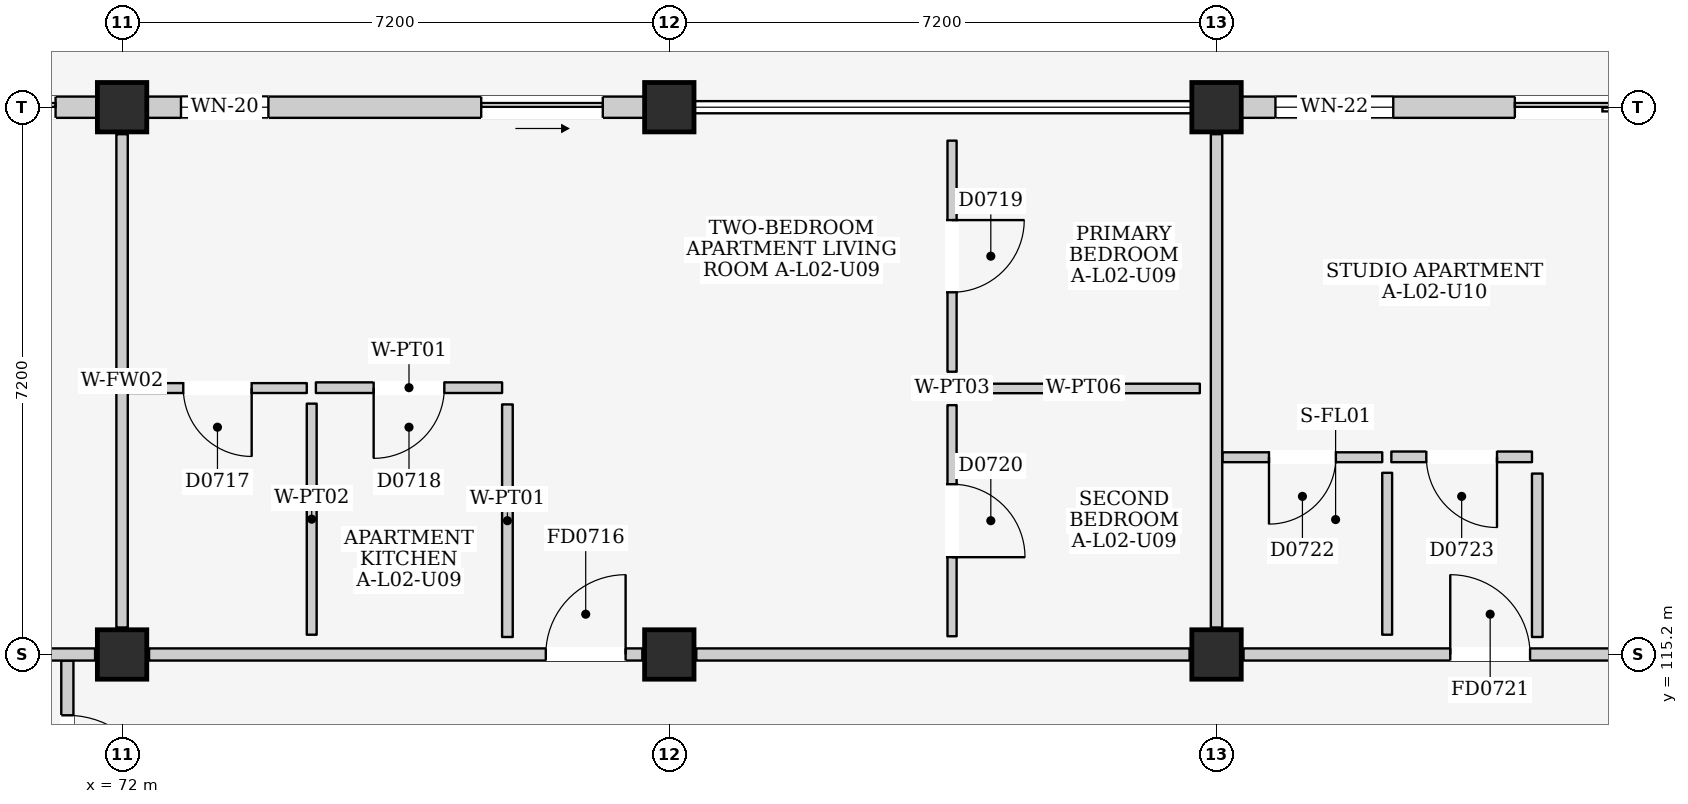
"""IFC4 building model, lengths in metres.
Left out: names, types, materials, properties, quantities, classifications, styles, units other than length and angle.
Written with IfcOpenShell. Run it as: python <this file> out.ifc"""

import sys

from ifc_helpers import new_model, si_unit, direction, frame, frame_2d, origin, origin_2d, place, context, subcontext, project, spatial, rectangle, extrude, element, fill, save


model = new_model("IFC4")
c1 = context("Model", 3, precision=1e-05, world=origin(), true_north=direction((0.0, 1.0)))
c2 = subcontext(c1, "Body", "Model", "MODEL_VIEW")
j1 = project(units=[si_unit("LENGTHUNIT", "METRE"), si_unit("PLANEANGLEUNIT", "RADIAN")], contexts=[c1])
p1 = place(None, origin())
s1 = spatial("IfcSite", under=j1, at=p1, CompositionType="ELEMENT")
p2 = place(p1, origin())
s2 = spatial("IfcBuilding", under=s1, at=p2, CompositionType="ELEMENT")
p3 = place(p2, frame((0.0, 0.0, 9.0)))
s3 = spatial("IfcBuildingStorey", under=s2, at=p3, CompositionType="ELEMENT", Elevation=9.0)
for number, where, z_axis, x_axis in (
    (1, (72.0, 115.2, 0.0), (0.0, 0.0, 1.0), (1.0, 0.0, 0.0)),
    (2, (72.0, 122.4, 0.0), (0.0, 0.0, 1.0), (1.0, 0.0, 0.0)),
    (3, (79.2, 115.2, 0.0), (0.0, 0.0, 1.0), (1.0, 0.0, 0.0)),
    (4, (79.2, 122.4, 0.0), (0.0, 0.0, 1.0), (1.0, 0.0, 0.0)),
    (5, (86.4, 115.2, 0.0), (0.0, 0.0, 1.0), (1.0, 0.0, 0.0)),
    (6, (86.4, 122.4, 0.0), (0.0, 0.0, 1.0), (1.0, 0.0, 0.0)),
):
    element("IfcColumn", number, at=place(p3, frame(where, z_axis=z_axis, x_axis=x_axis)), inside=s3, PredefinedType="COLUMN", context=c2, shape_type="SweptSolid", body=[
        extrude(rectangle(XDim=0.65, YDim=0.65, at=origin_2d()), origin(), (0.0, 0.0, 1.0), 3.2),
    ])
p4 = place(p3, frame((65.125, 122.4, 0.0), z_axis=(0.0, 0.0, 1.0), x_axis=(1.0, 0.0, 0.0)))
e7 = element("IfcWall", 7, at=p4, inside=s3, PredefinedType="ELEMENTEDWALL", context=c2, shape_type="SweptSolid", body=[
    extrude(rectangle(XDim=6.55, YDim=0.28, at=frame_2d((3.275, 0.0))), origin(), (0.0, 0.0, 1.0), 2.425),
])
p5 = place(p4, frame((4.2, 0.0, 0.0)))
e8 = element("IfcOpeningElement", 8, at=p5, cuts=e7, PredefinedType="OPENING", context=c2, shape_type="SweptSolid", body=[
    extrude(rectangle(XDim=1.8, YDim=2.12, at=frame_2d((0.9, 1.06))), frame((0.0, 0.155, 0.0), z_axis=(0.0, -1.0, 0.0), x_axis=(1.0, 0.0, 0.0)), (0.0, 0.0, 1.0), 0.31),
])
p6 = place(p4, frame((0.45, 0.0, 0.9)))
e9 = element("IfcOpeningElement", 9, at=p6, cuts=e7, PredefinedType="OPENING", context=c2, shape_type="SweptSolid", body=[
    extrude(rectangle(XDim=1.65, YDim=1.35, at=frame_2d((0.825, 0.675))), frame((0.0, 0.155, 0.0), z_axis=(0.0, -1.0, 0.0), x_axis=(1.0, 0.0, 0.0)), (0.0, 0.0, 1.0), 0.31),
])
p7 = place(p3, frame((72.325, 122.4, 0.0), z_axis=(0.0, 0.0, 1.0), x_axis=(1.0, 0.0, 0.0)))
e10 = element("IfcWall", 10, at=p7, inside=s3, PredefinedType="ELEMENTEDWALL", context=c2, shape_type="SweptSolid", body=[
    extrude(rectangle(XDim=6.55, YDim=0.28, at=frame_2d((3.275, 0.0))), origin(), (0.0, 0.0, 1.0), 2.425),
])
p8 = place(p7, frame((4.4, 0.0, 0.0)))
e11 = element("IfcOpeningElement", 11, at=p8, cuts=e10, PredefinedType="OPENING", context=c2, shape_type="SweptSolid", body=[
    extrude(rectangle(XDim=1.6, YDim=2.12, at=frame_2d((0.8, 1.06))), frame((0.0, 0.155, 0.0), z_axis=(0.0, -1.0, 0.0), x_axis=(1.0, 0.0, 0.0)), (0.0, 0.0, 1.0), 0.31),
])
p9 = place(p7, frame((0.45, 0.0, 0.9)))
e12 = element("IfcOpeningElement", 12, at=p9, cuts=e10, PredefinedType="OPENING", context=c2, shape_type="SweptSolid", body=[
    extrude(rectangle(XDim=1.15, YDim=1.15, at=frame_2d((0.575, 0.575))), frame((0.0, 0.155, 0.0), z_axis=(0.0, -1.0, 0.0), x_axis=(1.0, 0.0, 0.0)), (0.0, 0.0, 1.0), 0.31),
])
p10 = place(p3, frame((86.725, 122.4, 0.0), z_axis=(0.0, 0.0, 1.0), x_axis=(1.0, 0.0, 0.0)))
e13 = element("IfcWall", 13, at=p10, inside=s3, PredefinedType="ELEMENTEDWALL", context=c2, shape_type="SweptSolid", body=[
    extrude(rectangle(XDim=6.55, YDim=0.28, at=frame_2d((3.275, 0.0))), origin(), (0.0, 0.0, 1.0), 2.425),
])
p11 = place(p10, frame((3.6, 0.0, 0.0)))
e14 = element("IfcOpeningElement", 14, at=p11, cuts=e13, PredefinedType="OPENING", context=c2, shape_type="SweptSolid", body=[
    extrude(rectangle(XDim=2.4, YDim=2.12, at=frame_2d((1.2, 1.06))), frame((0.0, 0.155, 0.0), z_axis=(0.0, -1.0, 0.0), x_axis=(1.0, 0.0, 0.0)), (0.0, 0.0, 1.0), 0.31),
])
p12 = place(p10, frame((0.45, 0.0, 0.865)))
e15 = element("IfcOpeningElement", 15, at=p12, cuts=e13, PredefinedType="OPENING", context=c2, shape_type="SweptSolid", body=[
    extrude(rectangle(XDim=1.55, YDim=1.45, at=frame_2d((0.775, 0.725))), frame((0.0, 0.155, 0.0), z_axis=(0.0, -1.0, 0.0), x_axis=(1.0, 0.0, 0.0)), (0.0, 0.0, 1.0), 0.31),
])
p13 = place(p3, frame((71.28, 110.8, 0.0), z_axis=(0.0, 0.0, 1.0), x_axis=(0.0, 1.0, 0.0)))
e16 = element("IfcWall", 16, at=p13, inside=s3, PredefinedType="PARTITIONING", context=c2, shape_type="SweptSolid", body=[
    extrude(rectangle(XDim=4.32, YDim=0.16, at=frame_2d((2.16, 0.0))), origin(), (0.0, 0.0, 1.0), 2.96),
])
p14 = place(p13, frame((2.4, 0.0, 0.0)))
e17 = element("IfcOpeningElement", 17, at=p14, cuts=e16, PredefinedType="OPENING", context=c2, shape_type="SweptSolid", body=[
    extrude(rectangle(XDim=1.2, YDim=2.2, at=frame_2d((0.6, 1.1))), frame((0.0, 0.095, 0.0), z_axis=(0.0, -1.0, 0.0), x_axis=(1.0, 0.0, 0.0)), (0.0, 0.0, 1.0), 0.19),
])
p15 = place(p3, frame((65.155, 115.2, 0.0), z_axis=(0.0, 0.0, 1.0), x_axis=(1.0, 0.0, 0.0)))
e18 = element("IfcWall", 18, at=p15, inside=s3, PredefinedType="PARTITIONING", context=c2, shape_type="SweptSolid", body=[
    extrude(rectangle(XDim=6.49, YDim=0.16, at=frame_2d((3.245, 0.0))), origin(), (0.0, 0.0, 1.0), 2.295),
])
p16 = place(p15, frame((2.72, 0.0, 0.0)))
e19 = element("IfcOpeningElement", 19, at=p16, cuts=e18, PredefinedType="OPENING", context=c2, shape_type="SweptSolid", body=[
    extrude(rectangle(XDim=1.05, YDim=2.15, at=frame_2d((0.525, 1.075))), frame((0.0, 0.095, 0.0), z_axis=(0.0, -1.0, 0.0), x_axis=(1.0, 0.0, 0.0)), (0.0, 0.0, 1.0), 0.19),
])
p17 = place(p3, frame((72.0, 115.555, 0.0), z_axis=(0.0, 0.0, 1.0), x_axis=(0.0, 1.0, 0.0)))
e20 = element("IfcWall", 20, at=p17, inside=s3, PredefinedType="PARTITIONING", context=c2, shape_type="SweptSolid", body=[
    extrude(rectangle(XDim=6.49, YDim=0.15, at=frame_2d((3.245, 0.0))), origin(), (0.0, 0.0, 1.0), 2.395),
])
p18 = place(p3, frame((72.355, 115.2, 0.0), z_axis=(0.0, 0.0, 1.0), x_axis=(1.0, 0.0, 0.0)))
e21 = element("IfcWall", 21, at=p18, inside=s3, PredefinedType="PARTITIONING", context=c2, shape_type="SweptSolid", body=[
    extrude(rectangle(XDim=6.49, YDim=0.16, at=frame_2d((3.245, 0.0))), origin(), (0.0, 0.0, 1.0), 2.295),
])
p19 = place(p18, frame((5.22, 0.0, 0.0)))
e22 = element("IfcOpeningElement", 22, at=p19, cuts=e21, PredefinedType="OPENING", context=c2, shape_type="SweptSolid", body=[
    extrude(rectangle(XDim=1.05, YDim=2.15, at=frame_2d((0.525, 1.075))), frame((0.0, 0.095, 0.0), z_axis=(0.0, -1.0, 0.0), x_axis=(1.0, 0.0, 0.0)), (0.0, 0.0, 1.0), 0.19),
])
p20 = place(p3, frame((79.555, 115.2, 0.0), z_axis=(0.0, 0.0, 1.0), x_axis=(1.0, 0.0, 0.0)))
e23 = element("IfcWall", 23, at=p20, inside=s3, PredefinedType="PARTITIONING", context=c2, shape_type="SweptSolid", body=[
    extrude(rectangle(XDim=6.49, YDim=0.16, at=frame_2d((3.245, 0.0))), origin(), (0.0, 0.0, 1.0), 2.295),
])
p21 = place(p3, frame((86.4, 115.555, 0.0), z_axis=(0.0, 0.0, 1.0), x_axis=(0.0, 1.0, 0.0)))
e24 = element("IfcWall", 24, at=p21, inside=s3, PredefinedType="PARTITIONING", context=c2, shape_type="SweptSolid", body=[
    extrude(rectangle(XDim=6.49, YDim=0.15, at=frame_2d((3.245, 0.0))), origin(), (0.0, 0.0, 1.0), 2.395),
])
p22 = place(p3, frame((72.08, 118.705, 0.0), z_axis=(0.0, 0.0, 1.0), x_axis=(1.0, 0.0, 0.0)))
e25 = element("IfcWall", 25, at=p22, inside=s3, PredefinedType="PARTITIONING", context=c2, shape_type="SweptSolid", body=[
    extrude(rectangle(XDim=2.35, YDim=0.13, at=frame_2d((1.175, 0.0))), origin(), (0.0, 0.0, 1.0), 2.96),
])
p23 = place(p22, frame((0.725, 0.0, 0.0)))
e26 = element("IfcOpeningElement", 26, at=p23, cuts=e25, PredefinedType="OPENING", context=c2, shape_type="SweptSolid", body=[
    extrude(rectangle(XDim=0.9, YDim=2.1, at=frame_2d((0.45, 1.05))), frame((0.0, 0.08, 0.0), z_axis=(0.0, -1.0, 0.0), x_axis=(1.0, 0.0, 0.0)), (0.0, 0.0, 1.0), 0.16),
])
p24 = place(p3, frame((74.495, 115.46, 0.0), z_axis=(0.0, 0.0, 1.0), x_axis=(0.0, 1.0, 0.0)))
e27 = element("IfcWall", 27, at=p24, inside=s3, PredefinedType="PARTITIONING", context=c2, shape_type="SweptSolid", body=[
    extrude(rectangle(XDim=3.04, YDim=0.13, at=frame_2d((1.52, 0.0))), origin(), (0.0, 0.0, 1.0), 2.96),
])
p25 = place(p3, frame((74.55, 118.71, 0.0), z_axis=(0.0, 0.0, 1.0), x_axis=(1.0, 0.0, 0.0)))
e28 = element("IfcWall", 28, at=p25, inside=s3, PredefinedType="PARTITIONING", context=c2, shape_type="SweptSolid", body=[
    extrude(rectangle(XDim=2.45, YDim=0.14, at=frame_2d((1.225, 0.0))), origin(), (0.0, 0.0, 1.0), 2.96),
])
p26 = place(p25, frame((0.76, 0.0, 0.0)))
e29 = element("IfcOpeningElement", 29, at=p26, cuts=e28, PredefinedType="OPENING", context=c2, shape_type="SweptSolid", body=[
    extrude(rectangle(XDim=0.93, YDim=2.14, at=frame_2d((0.465, 1.07))), frame((0.0, 0.085, 0.0), z_axis=(0.0, -1.0, 0.0), x_axis=(1.0, 0.0, 0.0)), (0.0, 0.0, 1.0), 0.17),
])
p27 = place(p3, frame((77.07, 115.43, 0.0), z_axis=(0.0, 0.0, 1.0), x_axis=(0.0, 1.0, 0.0)))
e30 = element("IfcWall", 30, at=p27, inside=s3, PredefinedType="PARTITIONING", context=c2, shape_type="SweptSolid", body=[
    extrude(rectangle(XDim=3.06, YDim=0.14, at=frame_2d((1.53, 0.0))), origin(), (0.0, 0.0, 1.0), 2.96),
])
p28 = place(p3, frame((82.92, 118.92, 0.0), z_axis=(0.0, 0.0, 1.0), x_axis=(0.0, 1.0, 0.0)))
e31 = element("IfcWall", 31, at=p28, inside=s3, PredefinedType="PARTITIONING", context=c2, shape_type="SweptSolid", body=[
    extrude(rectangle(XDim=3.04, YDim=0.12, at=frame_2d((1.52, 0.0))), origin(), (0.0, 0.0, 1.0), 2.96),
])
p29 = place(p28, frame((1.045, 0.0, 0.0)))
e32 = element("IfcOpeningElement", 32, at=p29, cuts=e31, PredefinedType="OPENING", context=c2, shape_type="SweptSolid", body=[
    extrude(rectangle(XDim=0.95, YDim=2.15, at=frame_2d((0.475, 1.075))), frame((0.0, 0.075, 0.0), z_axis=(0.0, -1.0, 0.0), x_axis=(1.0, 0.0, 0.0)), (0.0, 0.0, 1.0), 0.15),
])
p30 = place(p3, frame((83.12, 118.7, 0.0), z_axis=(0.0, 0.0, 1.0), x_axis=(1.0, 0.0, 0.0)))
e33 = element("IfcWall", 33, at=p30, inside=s3, PredefinedType="PARTITIONING", context=c2, shape_type="SweptSolid", body=[
    extrude(rectangle(XDim=3.06, YDim=0.125, at=frame_2d((1.53, 0.0))), origin(), (0.0, 0.0, 1.0), 2.96),
])
p31 = place(p3, frame((82.92, 115.44, 0.0), z_axis=(0.0, 0.0, 1.0), x_axis=(0.0, 1.0, 0.0)))
e34 = element("IfcWall", 34, at=p31, inside=s3, PredefinedType="PARTITIONING", context=c2, shape_type="SweptSolid", body=[
    extrude(rectangle(XDim=3.04, YDim=0.12, at=frame_2d((1.52, 0.0))), origin(), (0.0, 0.0, 1.0), 2.96),
])
p32 = place(p31, frame((1.04, 0.0, 0.0)))
e35 = element("IfcOpeningElement", 35, at=p32, cuts=e34, PredefinedType="OPENING", context=c2, shape_type="SweptSolid", body=[
    extrude(rectangle(XDim=0.96, YDim=2.15, at=frame_2d((0.48, 1.075))), frame((0.0, 0.075, 0.0), z_axis=(0.0, -1.0, 0.0), x_axis=(1.0, 0.0, 0.0)), (0.0, 0.0, 1.0), 0.15),
])
p33 = place(p3, frame((86.755, 115.2, 0.0), z_axis=(0.0, 0.0, 1.0), x_axis=(1.0, 0.0, 0.0)))
e36 = element("IfcWall", 36, at=p33, inside=s3, PredefinedType="PARTITIONING", context=c2, shape_type="SweptSolid", body=[
    extrude(rectangle(XDim=6.49, YDim=0.16, at=frame_2d((3.245, 0.0))), origin(), (0.0, 0.0, 1.0), 2.295),
])
p34 = place(p33, frame((2.72, 0.0, 0.0)))
e37 = element("IfcOpeningElement", 37, at=p34, cuts=e36, PredefinedType="OPENING", context=c2, shape_type="SweptSolid", body=[
    extrude(rectangle(XDim=1.05, YDim=2.15, at=frame_2d((0.525, 1.075))), frame((0.0, 0.095, 0.0), z_axis=(0.0, -1.0, 0.0), x_axis=(1.0, 0.0, 0.0)), (0.0, 0.0, 1.0), 0.19),
])
p35 = place(p3, frame((86.48, 117.795, 0.0), z_axis=(0.0, 0.0, 1.0), x_axis=(1.0, 0.0, 0.0)))
e38 = element("IfcWall", 38, at=p35, inside=s3, PredefinedType="PARTITIONING", context=c2, shape_type="SweptSolid", body=[
    extrude(rectangle(XDim=2.1, YDim=0.13, at=frame_2d((1.05, 0.0))), origin(), (0.0, 0.0, 1.0), 2.96),
])
p36 = place(p35, frame((0.61, 0.0, 0.0)))
e39 = element("IfcOpeningElement", 39, at=p36, cuts=e38, PredefinedType="OPENING", context=c2, shape_type="SweptSolid", body=[
    extrude(rectangle(XDim=0.88, YDim=2.1, at=frame_2d((0.44, 1.05))), frame((0.0, 0.08, 0.0), z_axis=(0.0, -1.0, 0.0), x_axis=(1.0, 0.0, 0.0)), (0.0, 0.0, 1.0), 0.16),
])
p37 = place(p3, frame((88.645, 115.46, 0.0), z_axis=(0.0, 0.0, 1.0), x_axis=(0.0, 1.0, 0.0)))
e40 = element("IfcWall", 40, at=p37, inside=s3, PredefinedType="PARTITIONING", context=c2, shape_type="SweptSolid", body=[
    extrude(rectangle(XDim=2.13, YDim=0.13, at=frame_2d((1.065, 0.0))), origin(), (0.0, 0.0, 1.0), 2.96),
])
p38 = place(p3, frame((88.7, 117.8, 0.0), z_axis=(0.0, 0.0, 1.0), x_axis=(1.0, 0.0, 0.0)))
e41 = element("IfcWall", 41, at=p38, inside=s3, PredefinedType="PARTITIONING", context=c2, shape_type="SweptSolid", body=[
    extrude(rectangle(XDim=1.85, YDim=0.14, at=frame_2d((0.925, 0.0))), origin(), (0.0, 0.0, 1.0), 2.96),
])
p39 = place(p38, frame((0.46, 0.0, 0.0)))
e42 = element("IfcOpeningElement", 42, at=p39, cuts=e41, PredefinedType="OPENING", context=c2, shape_type="SweptSolid", body=[
    extrude(rectangle(XDim=0.93, YDim=2.14, at=frame_2d((0.465, 1.07))), frame((0.0, 0.085, 0.0), z_axis=(0.0, -1.0, 0.0), x_axis=(1.0, 0.0, 0.0)), (0.0, 0.0, 1.0), 0.17),
])
p40 = place(p3, frame((90.62, 115.43, 0.0), z_axis=(0.0, 0.0, 1.0), x_axis=(0.0, 1.0, 0.0)))
e43 = element("IfcWall", 43, at=p40, inside=s3, PredefinedType="PARTITIONING", context=c2, shape_type="SweptSolid", body=[
    extrude(rectangle(XDim=2.15, YDim=0.14, at=frame_2d((1.075, 0.0))), origin(), (0.0, 0.0, 1.0), 2.96),
])
p41 = place(p5, frame((1.8, 0.0, 0.0), z_axis=(0.0, 0.0, 1.0), x_axis=(-1.0, 0.0, 0.0)))
e44 = element("IfcDoor", 44, at=p41, inside=s3, OperationType="SLIDING_TO_LEFT", PredefinedType="DOOR", context=c2, shape_type="SweptSolid", body=[
    extrude(rectangle(XDim=1.8, YDim=2.12, at=frame_2d((0.9, 1.06))), frame((0.0, 0.025, 0.0), z_axis=(0.0, -1.0, 0.0), x_axis=(1.0, 0.0, 0.0)), (0.0, 0.0, 1.0), 0.05),
])
fill(e8, e44)
p42 = place(p8, frame((1.6, 0.0, 0.0), z_axis=(0.0, 0.0, 1.0), x_axis=(-1.0, 0.0, 0.0)))
e45 = element("IfcDoor", 45, at=p42, inside=s3, OperationType="SLIDING_TO_RIGHT", PredefinedType="DOOR", context=c2, shape_type="SweptSolid", body=[
    extrude(rectangle(XDim=1.6, YDim=2.12, at=frame_2d((0.8, 1.06))), frame((0.0, 0.025, 0.0), z_axis=(0.0, -1.0, 0.0), x_axis=(1.0, 0.0, 0.0)), (0.0, 0.0, 1.0), 0.05),
])
fill(e11, e45)
p43 = place(p9, origin())
e46 = element("IfcWindow", 46, at=p43, inside=s3, PartitioningType="SINGLE_PANEL", PredefinedType="WINDOW", context=c2, shape_type="SweptSolid", body=[
    extrude(rectangle(XDim=1.15, YDim=1.15, at=frame_2d((0.575, 0.575))), frame((0.0, 0.03, 0.0), z_axis=(0.0, -1.0, 0.0), x_axis=(1.0, 0.0, 0.0)), (0.0, 0.0, 1.0), 0.06),
])
fill(e12, e46)
p44 = place(p11, frame((2.4, 0.0, 0.0), z_axis=(0.0, 0.0, 1.0), x_axis=(-1.0, 0.0, 0.0)))
e47 = element("IfcDoor", 47, at=p44, inside=s3, OperationType="DOUBLE_DOOR_SLIDING", PredefinedType="DOOR", context=c2, shape_type="SweptSolid", body=[
    extrude(rectangle(XDim=2.4, YDim=2.12, at=frame_2d((1.2, 1.06))), frame((0.0, 0.025, 0.0), z_axis=(0.0, -1.0, 0.0), x_axis=(1.0, 0.0, 0.0)), (0.0, 0.0, 1.0), 0.05),
])
fill(e14, e47)
p45 = place(p12, origin())
e48 = element("IfcWindow", 48, at=p45, inside=s3, PartitioningType="DOUBLE_PANEL_VERTICAL", PredefinedType="WINDOW", context=c2, shape_type="SweptSolid", body=[
    extrude(rectangle(XDim=1.55, YDim=1.45, at=frame_2d((0.775, 0.725))), frame((0.0, 0.03, 0.0), z_axis=(0.0, -1.0, 0.0), x_axis=(1.0, 0.0, 0.0)), (0.0, 0.0, 1.0), 0.06),
])
fill(e15, e48)
p46 = place(p14, frame((1.2, 0.0, 0.0), z_axis=(0.0, 0.0, 1.0), x_axis=(-1.0, 0.0, 0.0)))
e49 = element("IfcDoor", 49, at=p46, inside=s3, OperationType="SINGLE_SWING_RIGHT", PredefinedType="DOOR", context=c2, shape_type="SweptSolid", body=[
    extrude(rectangle(XDim=1.2, YDim=2.2, at=frame_2d((0.6, 1.1))), frame((0.0, 0.025, 0.0), z_axis=(0.0, -1.0, 0.0), x_axis=(1.0, 0.0, 0.0)), (0.0, 0.0, 1.0), 0.05),
])
fill(e17, e49)
p47 = place(p19, origin())
e50 = element("IfcDoor", 50, at=p47, inside=s3, OperationType="SINGLE_SWING_RIGHT", PredefinedType="DOOR", context=c2, shape_type="SweptSolid", body=[
    extrude(rectangle(XDim=1.05, YDim=2.15, at=frame_2d((0.525, 1.075))), frame((0.0, 0.025, 0.0), z_axis=(0.0, -1.0, 0.0), x_axis=(1.0, 0.0, 0.0)), (0.0, 0.0, 1.0), 0.05),
])
fill(e22, e50)
p48 = place(p23, frame((0.9, 0.0, 0.0), z_axis=(0.0, 0.0, 1.0), x_axis=(-1.0, 0.0, 0.0)))
e51 = element("IfcDoor", 51, at=p48, inside=s3, OperationType="SINGLE_SWING_LEFT", PredefinedType="DOOR", context=c2, shape_type="SweptSolid", body=[
    extrude(rectangle(XDim=0.9, YDim=2.1, at=frame_2d((0.45, 1.05))), frame((0.0, 0.025, 0.0), z_axis=(0.0, -1.0, 0.0), x_axis=(1.0, 0.0, 0.0)), (0.0, 0.0, 1.0), 0.05),
])
fill(e26, e51)
p49 = place(p26, frame((0.93, 0.0, 0.0), z_axis=(0.0, 0.0, 1.0), x_axis=(-1.0, 0.0, 0.0)))
e52 = element("IfcDoor", 52, at=p49, inside=s3, OperationType="SINGLE_SWING_RIGHT", PredefinedType="DOOR", context=c2, shape_type="SweptSolid", body=[
    extrude(rectangle(XDim=0.93, YDim=2.14, at=frame_2d((0.465, 1.07))), frame((0.0, 0.025, 0.0), z_axis=(0.0, -1.0, 0.0), x_axis=(1.0, 0.0, 0.0)), (0.0, 0.0, 1.0), 0.05),
])
fill(e29, e52)
p50 = place(p29, frame((0.95, 0.0, 0.0), z_axis=(0.0, 0.0, 1.0), x_axis=(-1.0, 0.0, 0.0)))
e53 = element("IfcDoor", 53, at=p50, inside=s3, OperationType="SINGLE_SWING_LEFT", PredefinedType="DOOR", context=c2, shape_type="SweptSolid", body=[
    extrude(rectangle(XDim=0.95, YDim=2.15, at=frame_2d((0.475, 1.075))), frame((0.0, 0.025, 0.0), z_axis=(0.0, -1.0, 0.0), x_axis=(1.0, 0.0, 0.0)), (0.0, 0.0, 1.0), 0.05),
])
fill(e32, e53)
p51 = place(p32, frame((0.96, 0.0, 0.0), z_axis=(0.0, 0.0, 1.0), x_axis=(-1.0, 0.0, 0.0)))
e54 = element("IfcDoor", 54, at=p51, inside=s3, OperationType="SINGLE_SWING_RIGHT", PredefinedType="DOOR", context=c2, shape_type="SweptSolid", body=[
    extrude(rectangle(XDim=0.96, YDim=2.15, at=frame_2d((0.48, 1.075))), frame((0.0, 0.025, 0.0), z_axis=(0.0, -1.0, 0.0), x_axis=(1.0, 0.0, 0.0)), (0.0, 0.0, 1.0), 0.05),
])
fill(e35, e54)
p52 = place(p34, origin())
e55 = element("IfcDoor", 55, at=p52, inside=s3, OperationType="SINGLE_SWING_LEFT", PredefinedType="DOOR", context=c2, shape_type="SweptSolid", body=[
    extrude(rectangle(XDim=1.05, YDim=2.15, at=frame_2d((0.525, 1.075))), frame((0.0, 0.025, 0.0), z_axis=(0.0, -1.0, 0.0), x_axis=(1.0, 0.0, 0.0)), (0.0, 0.0, 1.0), 0.05),
])
fill(e37, e55)
p53 = place(p36, frame((0.88, 0.0, 0.0), z_axis=(0.0, 0.0, 1.0), x_axis=(-1.0, 0.0, 0.0)))
e56 = element("IfcDoor", 56, at=p53, inside=s3, OperationType="SINGLE_SWING_RIGHT", PredefinedType="DOOR", context=c2, shape_type="SweptSolid", body=[
    extrude(rectangle(XDim=0.88, YDim=2.1, at=frame_2d((0.44, 1.05))), frame((0.0, 0.025, 0.0), z_axis=(0.0, -1.0, 0.0), x_axis=(1.0, 0.0, 0.0)), (0.0, 0.0, 1.0), 0.05),
])
fill(e39, e56)
p54 = place(p39, frame((0.93, 0.0, 0.0), z_axis=(0.0, 0.0, 1.0), x_axis=(-1.0, 0.0, 0.0)))
e57 = element("IfcDoor", 57, at=p54, inside=s3, OperationType="SINGLE_SWING_LEFT", PredefinedType="DOOR", context=c2, shape_type="SweptSolid", body=[
    extrude(rectangle(XDim=0.93, YDim=2.14, at=frame_2d((0.465, 1.07))), frame((0.0, 0.025, 0.0), z_axis=(0.0, -1.0, 0.0), x_axis=(1.0, 0.0, 0.0)), (0.0, 0.0, 1.0), 0.05),
])
fill(e42, e57)
save(model, sys.argv[1])
